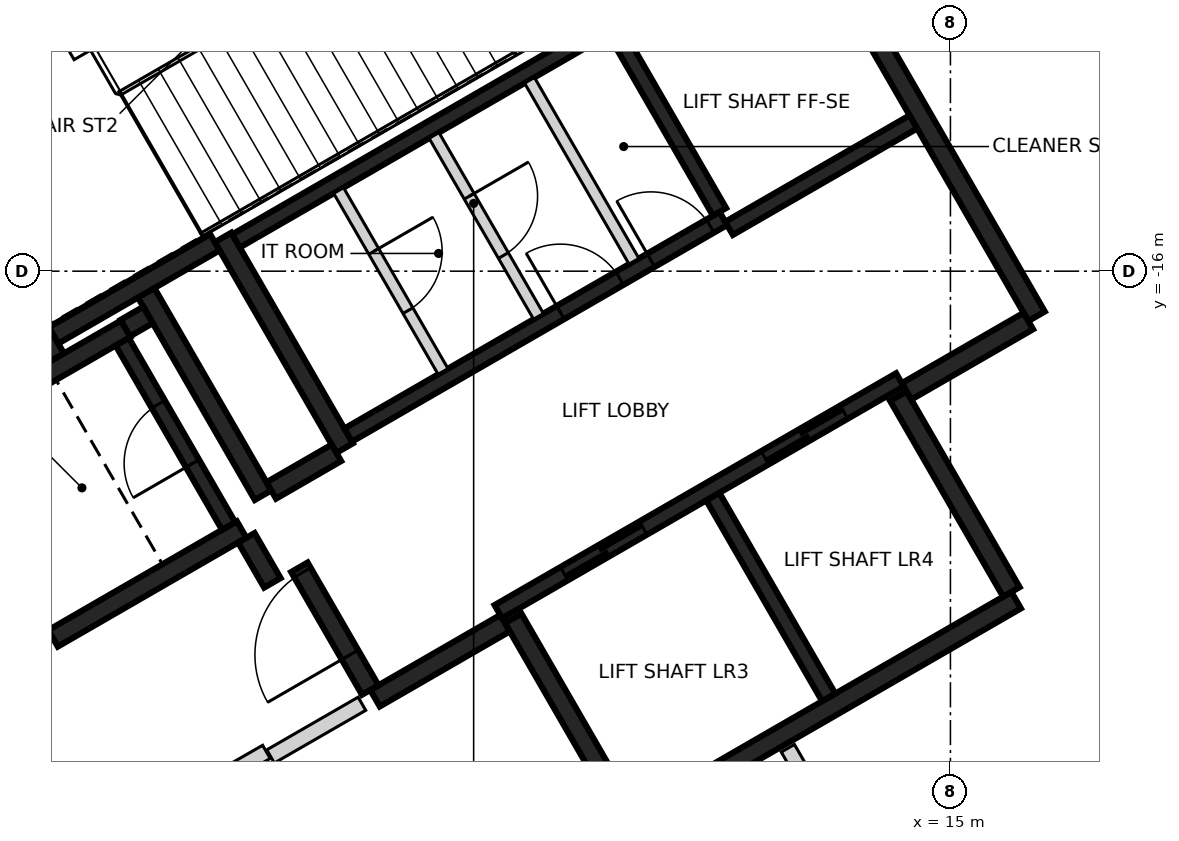
"""IFC4 building model, lengths in metres.
Left out: names, types, materials, properties, quantities, classifications, styles, units other than length and angle.
Written with IfcOpenShell. Run it as: python <this file> out.ifc"""

import sys

from ifc_helpers import new_model, si_unit, direction, frame, frame_2d, origin, place, context, subcontext, project, spatial, rectangle, extrude, element, fill, save


model = new_model("IFC4")
c1 = context("Model", 3, precision=1e-05, world=origin(), true_north=direction((0.0, 1.0)))
c2 = subcontext(c1, "Body", "Model", "MODEL_VIEW")
j1 = project(units=[si_unit("LENGTHUNIT", "METRE"), si_unit("PLANEANGLEUNIT", "RADIAN")], contexts=[c1])
p1 = place(None, origin())
s1 = spatial("IfcSite", under=j1, at=p1, CompositionType="ELEMENT")
p2 = place(p1, origin())
s2 = spatial("IfcBuilding", under=s1, at=p2, CompositionType="ELEMENT")
p3 = place(p2, frame((0.0, 0.0, 123.8)))
s3 = spatial("IfcBuildingStorey", under=s2, at=p3, CompositionType="ELEMENT", Elevation=123.8)
p4 = place(p3, frame((13.008, -11.181, 0.0), z_axis=(0.0, 0.0, 1.0), x_axis=(0.500004234368, -0.866022959057, 0.0)))
e1 = element("IfcWall", 1, at=p4, inside=s3, PredefinedType="SHEAR", context=c2, shape_type="SweptSolid", body=[
    extrude(rectangle(XDim=6.25, YDim=0.25, at=frame_2d((3.125, 0.0))), origin(), (0.0, 0.0, 1.0), 4.6),
])
p5 = place(p3, frame((15.865, -20.328, 0.0), z_axis=(0.0, 0.0, 1.0), x_axis=(-0.86602852612, -0.499994591916, 0.0)))
e2 = element("IfcWall", 2, at=p5, inside=s3, PredefinedType="SHEAR", context=c2, shape_type="SweptSolid", body=[
    extrude(rectangle(XDim=5.85, YDim=0.25, at=frame_2d((2.925, 0.0))), origin(), (0.0, 0.0, 1.0), 4.6),
])
p6 = place(p3, frame((3.235, -17.153, 0.0), z_axis=(0.0, 0.0, 1.0), x_axis=(-0.500008851346, 0.866020293397, 0.0)))
e3 = element("IfcWall", 3, at=p6, inside=s3, PredefinedType="SHEAR", context=c2, shape_type="SweptSolid", body=[
    extrude(rectangle(XDim=5.51, YDim=0.25, at=frame_2d((2.755, 0.0))), origin(), (0.0, 0.0, 1.0), 4.6),
])
p7 = place(p3, frame((7.031, -18.327, 0.0), z_axis=(0.0, 0.0, 1.0), x_axis=(-0.499971222258, 0.866042017984, 0.0)))
e4 = element("IfcWall", 4, at=p7, inside=s3, PredefinedType="SHEAR", context=c2, shape_type="SweptSolid", body=[
    extrude(rectangle(XDim=3.2, YDim=0.25, at=frame_2d((1.6, 0.0))), origin(), (0.0, 0.0, 1.0), 4.6),
])
for number, where, z_axis, x_axis in (
    (5, (14.315, -17.644, 0.0), (0.0, 0.0, 1.0), (0.5, -0.866, 0.0)),
    (6, (10.736, -23.145, 0.0), (0.0, 0.0, 1.0), (-0.5, 0.866, 0.0)),
):
    element("IfcWall", number, at=place(p3, frame(where, z_axis=z_axis, x_axis=x_axis)), inside=s3, PredefinedType="SHEAR", context=c2, shape_type="SweptSolid", body=[
        extrude(rectangle(XDim=2.974, YDim=0.25, at=frame_2d((1.487, 0.0))), origin(), (0.0, 0.0, 1.0), 4.6),
    ])
p8 = place(p3, frame((3.085, -20.894, 0.0), z_axis=(0.0, 0.0, 1.0), x_axis=(-0.499978833458, 0.866037623948, 0.0)))
e7 = element("IfcWall", 7, at=p8, inside=s3, PredefinedType="SHEAR", context=c2, shape_type="SweptSolid", body=[
    extrude(rectangle(XDim=3.05, YDim=0.25, at=frame_2d((1.525, 0.0))), origin(), (0.0, 0.0, 1.0), 4.6),
])
p9 = place(p3, frame((1.669, -18.19, 0.0), z_axis=(0.0, 0.0, 1.0), x_axis=(0.866042235819, 0.499970844928, 0.0)))
e8 = element("IfcWall", 8, at=p9, inside=s3, PredefinedType="SHEAR", context=c2, shape_type="SweptSolid", body=[
    extrude(rectangle(XDim=2.865, YDim=0.25, at=frame_2d((1.432, 0.0))), origin(), (0.0, 0.0, 1.0), 4.6),
])
p10 = place(p3, frame((5.675, -19.399, 0.0), z_axis=(0.0, 0.0, 1.0), x_axis=(-0.866026637627, -0.499997862916, 0.0)))
e9 = element("IfcWall", 9, at=p10, inside=s3, PredefinedType="SHEAR", context=c2, shape_type="SweptSolid", body=[
    extrude(rectangle(XDim=2.865, YDim=0.25, at=frame_2d((1.432, 0.0))), origin(), (0.0, 0.0, 1.0), 4.6),
])
p11 = place(p3, frame((4.414, -16.276, 0.0), z_axis=(0.0, 0.0, 1.0), x_axis=(0.500003324108, -0.866023484601, 0.0)))
e10 = element("IfcWall", 10, at=p11, inside=s3, PredefinedType="SHEAR", context=c2, shape_type="SweptSolid", body=[
    extrude(rectangle(XDim=3.085, YDim=0.25, at=frame_2d((1.542, 0.0))), origin(), (0.0, 0.0, 1.0), 4.6),
])
p12 = place(p3, frame((5.322, -15.619, 0.0), z_axis=(0.0, 0.0, 1.0), x_axis=(-0.866026229868, -0.499998569178, 0.0)))
e11 = element("IfcWall", 11, at=p12, inside=s3, PredefinedType="SHEAR", context=c2, shape_type="SweptSolid", body=[
    extrude(rectangle(XDim=2.449, YDim=0.25, at=frame_2d((1.225, 0.0))), origin(), (0.0, 0.0, 1.0), 4.6),
])
p13 = place(p3, frame((9.14, -20.631, 0.0), z_axis=(0.0, 0.0, 1.0), x_axis=(-0.866043531843, -0.499968599967, 0.0)))
e12 = element("IfcWall", 12, at=p13, inside=s3, PredefinedType="SHEAR", context=c2, shape_type="SweptSolid", body=[
    extrude(rectangle(XDim=1.975, YDim=0.25, at=frame_2d((0.987, 0.0))), origin(), (0.0, 0.0, 1.0), 4.6),
])
p14 = place(p3, frame((16.025, -16.656, 0.0), z_axis=(0.0, 0.0, 1.0), x_axis=(-0.866016279763, -0.500015802937, 0.0)))
e13 = element("IfcWall", 13, at=p14, inside=s3, PredefinedType="SHEAR", context=c2, shape_type="SweptSolid", body=[
    extrude(rectangle(XDim=1.849, YDim=0.25, at=frame_2d((0.925, 0.0))), origin(), (0.0, 0.0, 1.0), 4.6),
])
p15 = place(p3, frame((7.367, -21.51, 0.0), z_axis=(0.0, 0.0, 1.0), x_axis=(-0.499983108224, 0.866035156036, 0.0)))
e14 = element("IfcWall", 14, at=p15, inside=s3, PredefinedType="SHEAR", context=c2, shape_type="SweptSolid", body=[
    extrude(rectangle(XDim=1.865, YDim=0.25, at=frame_2d((0.932, 0.0))), origin(), (0.0, 0.0, 1.0), 4.6),
])
p16 = place(p15, frame((0.535, 0.0, 0.0)))
e15 = element("IfcOpeningElement", 15, at=p16, cuts=e14, PredefinedType="OPENING", context=c2, shape_type="SweptSolid", body=[
    extrude(rectangle(XDim=1.25, YDim=2.1, at=frame_2d((0.625, 1.05))), frame((0.0, 0.135, 0.0), z_axis=(0.0, -1.0, 0.0), x_axis=(1.0, 0.0, 0.0)), (0.0, 0.0, 1.0), 0.27),
])
p17 = place(p3, frame((6.065, -18.885, 0.0), z_axis=(0.0, 0.0, 1.0), x_axis=(0.866017078145, 0.500014420154, 0.0)))
e16 = element("IfcWall", 16, at=p17, inside=s3, PredefinedType="SHEAR", context=c2, shape_type="SweptSolid", body=[
    extrude(rectangle(XDim=0.989, YDim=0.25, at=frame_2d((0.495, 0.0))), origin(), (0.0, 0.0, 1.0), 4.6),
])
p18 = place(p3, frame((6.08, -20.1, 0.0), z_axis=(0.0, 0.0, 1.0), x_axis=(-0.500051773299, 0.865995510393, 0.0)))
e17 = element("IfcWall", 17, at=p18, inside=s3, PredefinedType="SHEAR", context=c2, shape_type="SweptSolid", body=[
    extrude(rectangle(XDim=0.685, YDim=0.25, at=frame_2d((0.342, 0.0))), origin(), (0.0, 0.0, 1.0), 4.6),
])
p19 = place(p3, frame((4.145, -16.749, 0.0), z_axis=(0.0, 0.0, 1.0), x_axis=(0.866185586049, 0.49972245349, 0.0)))
e18 = element("IfcWall", 18, at=p19, inside=s3, PredefinedType="SHEAR", context=c2, shape_type="SweptSolid", body=[
    extrude(rectangle(XDim=0.344, YDim=0.25, at=frame_2d((0.172, 0.0))), origin(), (0.0, 0.0, 1.0), 4.6),
])
p20 = place(p3, frame((9.052, -20.48, 0.0), z_axis=(0.0, 0.0, 1.0), x_axis=(0.866030299012, 0.499991521122, 0.0)))
e19 = element("IfcWall", 19, at=p20, inside=s3, PredefinedType="SHEAR", context=c2, shape_type="SweptSolid", body=[
    extrude(rectangle(XDim=6.1, YDim=0.2, at=frame_2d((3.05, 0.0))), origin(), (0.0, 0.0, 1.0), 4.6),
])
p21 = place(p20, frame((1.0, 0.0, 0.0)))
e20 = element("IfcOpeningElement", 20, at=p21, cuts=e19, PredefinedType="OPENING", context=c2, shape_type="SweptSolid", body=[
    extrude(rectangle(XDim=1.2, YDim=2.1, at=frame_2d((0.6, 1.05))), frame((0.0, 0.11, 0.0), z_axis=(0.0, -1.0, 0.0), x_axis=(1.0, 0.0, 0.0)), (0.0, 0.0, 1.0), 0.22),
])
p22 = place(p20, frame((4.05, 0.0, 0.0)))
e21 = element("IfcOpeningElement", 21, at=p22, cuts=e19, PredefinedType="OPENING", context=c2, shape_type="SweptSolid", body=[
    extrude(rectangle(XDim=1.2, YDim=2.1, at=frame_2d((0.6, 1.05))), frame((0.0, 0.11, 0.0), z_axis=(0.0, -1.0, 0.0), x_axis=(1.0, 0.0, 0.0)), (0.0, 0.0, 1.0), 0.22),
])
p23 = place(p3, frame((10.538, -12.752, 0.0), z_axis=(0.0, 0.0, 1.0), x_axis=(-0.866038630372, -0.499977090179, 0.0)))
e22 = element("IfcWall", 22, at=p23, inside=s3, PredefinedType="SHEAR", context=c2, shape_type="SweptSolid", body=[
    extrude(rectangle(XDim=5.699, YDim=0.2, at=frame_2d((2.85, 0.0))), origin(), (0.0, 0.0, 1.0), 4.6),
])
p24 = place(p3, frame((7.077, -18.156, 0.0), z_axis=(0.0, 0.0, 1.0), x_axis=(0.866038630372, 0.499977090179, 0.0)))
e23 = element("IfcWall", 23, at=p24, inside=s3, PredefinedType="SHEAR", context=c2, shape_type="SweptSolid", body=[
    extrude(rectangle(XDim=5.699, YDim=0.2, at=frame_2d((2.85, 0.0))), origin(), (0.0, 0.0, 1.0), 4.6),
])
p25 = place(p24, frame((3.224, 0.0, 0.0)))
e24 = element("IfcOpeningElement", 24, at=p25, cuts=e23, PredefinedType="OPENING", context=c2, shape_type="SweptSolid", body=[
    extrude(rectangle(XDim=0.9, YDim=2.1, at=frame_2d((0.45, 1.05))), frame((0.0, 0.11, 0.0), z_axis=(0.0, -1.0, 0.0), x_axis=(1.0, 0.0, 0.0)), (0.0, 0.0, 1.0), 0.22),
])
p26 = place(p24, frame((4.599, 0.0, 0.0)))
e25 = element("IfcOpeningElement", 25, at=p26, cuts=e23, PredefinedType="OPENING", context=c2, shape_type="SweptSolid", body=[
    extrude(rectangle(XDim=0.9, YDim=2.1, at=frame_2d((0.45, 1.05))), frame((0.0, 0.11, 0.0), z_axis=(0.0, -1.0, 0.0), x_axis=(1.0, 0.0, 0.0)), (0.0, 0.0, 1.0), 0.22),
])
p27 = place(p3, frame((11.875, -18.967, 0.0), z_axis=(0.0, 0.0, 1.0), x_axis=(0.49998131003, -0.866036194175, 0.0)))
e26 = element("IfcWall", 26, at=p27, inside=s3, PredefinedType="SHEAR", context=c2, shape_type="SweptSolid", body=[
    extrude(rectangle(XDim=3.048, YDim=0.2, at=frame_2d((1.524, 0.0))), origin(), (0.0, 0.0, 1.0), 4.6),
])
p28 = place(p3, frame((5.503, -19.352, 0.0), z_axis=(0.0, 0.0, 1.0), x_axis=(-0.499986818241, 0.866033014143, 0.0)))
e27 = element("IfcWall", 27, at=p28, inside=s3, PredefinedType="SHEAR", context=c2, shape_type="SweptSolid", body=[
    extrude(rectangle(XDim=2.798, YDim=0.2, at=frame_2d((1.399, 0.0))), origin(), (0.0, 0.0, 1.0), 4.6),
])
p29 = place(p28, frame((0.949, 0.0, 0.0)))
e28 = element("IfcOpeningElement", 28, at=p29, cuts=e27, PredefinedType="OPENING", context=c2, shape_type="SweptSolid", body=[
    extrude(rectangle(XDim=0.9, YDim=2.1, at=frame_2d((0.45, 1.05))), frame((0.0, 0.11, 0.0), z_axis=(0.0, -1.0, 0.0), x_axis=(1.0, 0.0, 0.0)), (0.0, 0.0, 1.0), 0.22),
])
p30 = place(p3, frame((11.963, -15.22, 0.0), z_axis=(0.0, 0.0, 1.0), x_axis=(-0.500034990121, 0.866005201286, 0.0)))
e29 = element("IfcWall", 29, at=p30, inside=s3, PredefinedType="SHEAR", context=c2, shape_type="SweptSolid", body=[
    extrude(rectangle(XDim=2.75, YDim=0.2, at=frame_2d((1.375, 0.0))), origin(), (0.0, 0.0, 1.0), 4.6),
])
p31 = place(p3, frame((14.512, -14.037, 0.0), z_axis=(0.0, 0.0, 1.0), x_axis=(-0.866044696403, -0.499966582715, 0.0)))
e30 = element("IfcWall", 30, at=p31, inside=s3, PredefinedType="SHEAR", context=c2, shape_type="SweptSolid", body=[
    extrude(rectangle(XDim=2.799, YDim=0.2, at=frame_2d((1.399, 0.0))), origin(), (0.0, 0.0, 1.0), 4.6),
])
p32 = place(p3, frame((8.207, -14.214, 0.0), z_axis=(0.0, 0.0, 1.0), x_axis=(0.50002746344, -0.86600954718, 0.0)))
e31 = element("IfcWall", 31, at=p32, inside=s3, PredefinedType="PARTITIONING", context=c2, shape_type="SweptSolid", body=[
    extrude(rectangle(XDim=2.748, YDim=0.15, at=frame_2d((1.374, 0.0))), origin(), (0.0, 0.0, 1.0), 4.6),
])
p33 = place(p32, frame((0.924, 0.0, 0.0)))
e32 = element("IfcOpeningElement", 32, at=p33, cuts=e31, PredefinedType="OPENING", context=c2, shape_type="SweptSolid", body=[
    extrude(rectangle(XDim=0.9, YDim=2.1, at=frame_2d((0.45, 1.05))), frame((0.0, 0.085, 0.0), z_axis=(0.0, -1.0, 0.0), x_axis=(1.0, 0.0, 0.0)), (0.0, 0.0, 1.0), 0.17),
])
p34 = place(p3, frame((9.462, -13.489, 0.0), z_axis=(0.0, 0.0, 1.0), x_axis=(0.499988999718, -0.866031754707, 0.0)))
e33 = element("IfcWall", 33, at=p34, inside=s3, PredefinedType="PARTITIONING", context=c2, shape_type="SweptSolid", body=[
    extrude(rectangle(XDim=2.749, YDim=0.15, at=frame_2d((1.374, 0.0))), origin(), (0.0, 0.0, 1.0), 4.6),
])
p35 = place(p3, frame((6.951, -14.939, 0.0), z_axis=(0.0, 0.0, 1.0), x_axis=(0.499988999718, -0.866031754707, 0.0)))
e34 = element("IfcWall", 34, at=p35, inside=s3, PredefinedType="PARTITIONING", context=c2, shape_type="SweptSolid", body=[
    extrude(rectangle(XDim=2.749, YDim=0.15, at=frame_2d((1.374, 0.0))), origin(), (0.0, 0.0, 1.0), 4.6),
])
p36 = place(p35, frame((0.924, 0.0, 0.0)))
e35 = element("IfcOpeningElement", 35, at=p36, cuts=e34, PredefinedType="OPENING", context=c2, shape_type="SweptSolid", body=[
    extrude(rectangle(XDim=0.9, YDim=2.1, at=frame_2d((0.45, 1.05))), frame((0.0, 0.085, 0.0), z_axis=(0.0, -1.0, 0.0), x_axis=(1.0, 0.0, 0.0)), (0.0, 0.0, 1.0), 0.17),
])
p37 = place(p3, frame((4.019, -23.459, 0.0), z_axis=(0.0, 0.0, 1.0), x_axis=(0.867775707364, 0.496956056114, 0.0)))
e36 = element("IfcWall", 36, at=p37, inside=s3, PredefinedType="PARTITIONING", context=c2, shape_type="SweptSolid", body=[
    extrude(rectangle(XDim=2.284, YDim=0.2, at=frame_2d((1.142, 0.0))), origin(), (0.0, 0.0, 1.0), 4.6),
])
p38 = place(p3, frame((6.056, -22.384, 0.0), z_axis=(0.0, 0.0, 1.0), x_axis=(0.866276386163, 0.499565033581, 0.0)))
e37 = element("IfcWall", 37, at=p38, inside=s3, PredefinedType="PARTITIONING", context=c2, shape_type="SweptSolid", body=[
    extrude(rectangle(XDim=1.387, YDim=0.2, at=frame_2d((0.694, 0.0))), origin(), (0.0, 0.0, 1.0), 4.6),
])
p39 = place(p3, frame((12.861, -22.276, 0.0), z_axis=(0.0, 0.0, 1.0), x_axis=(0.500032570359, -0.866006598462, 0.0)))
e38 = element("IfcWall", 38, at=p39, inside=s3, PredefinedType="PARTITIONING", context=c2, shape_type="SweptSolid", body=[
    extrude(rectangle(XDim=7.587, YDim=0.2, at=frame_2d((3.793, 0.0))), origin(), (0.0, 0.0, 1.0), 4.6),
])
p40 = place(p39, frame((1.077, 0.0, 0.0)))
e39 = element("IfcOpeningElement", 39, at=p40, cuts=e38, PredefinedType="OPENING", context=c2, shape_type="SweptSolid", body=[
    extrude(rectangle(XDim=0.9, YDim=2.1, at=frame_2d((0.45, 1.05))), frame((0.0, 0.11, 0.0), z_axis=(0.0, -1.0, 0.0), x_axis=(1.0, 0.0, 0.0)), (0.0, 0.0, 1.0), 0.22),
])
p41 = place(p21, origin())
e40 = element("IfcDoor", 40, at=p41, inside=s3, OperationType="DOUBLE_DOOR_SLIDING", PredefinedType="DOOR", context=c2, shape_type="SweptSolid", body=[
    extrude(rectangle(XDim=1.2, YDim=2.1, at=frame_2d((0.6, 1.05))), frame((0.0, 0.025, 0.0), z_axis=(0.0, -1.0, 0.0), x_axis=(1.0, 0.0, 0.0)), (0.0, 0.0, 1.0), 0.05),
])
fill(e20, e40)
p42 = place(p22, origin())
e41 = element("IfcDoor", 41, at=p42, inside=s3, OperationType="DOUBLE_DOOR_SLIDING", PredefinedType="DOOR", context=c2, shape_type="SweptSolid", body=[
    extrude(rectangle(XDim=1.2, YDim=2.1, at=frame_2d((0.6, 1.05))), frame((0.0, 0.025, 0.0), z_axis=(0.0, -1.0, 0.0), x_axis=(1.0, 0.0, 0.0)), (0.0, 0.0, 1.0), 0.05),
])
fill(e21, e41)
p43 = place(p16, origin())
e42 = element("IfcDoor", 42, at=p43, inside=s3, OperationType="SINGLE_SWING_LEFT", PredefinedType="DOOR", context=c2, shape_type="SweptSolid", body=[
    extrude(rectangle(XDim=1.25, YDim=2.1, at=frame_2d((0.625, 1.05))), frame((0.0, 0.025, 0.0), z_axis=(0.0, -1.0, 0.0), x_axis=(1.0, 0.0, 0.0)), (0.0, 0.0, 1.0), 0.05),
])
fill(e15, e42)
p44 = place(p25, origin())
e43 = element("IfcDoor", 43, at=p44, inside=s3, OperationType="SINGLE_SWING_RIGHT", PredefinedType="DOOR", context=c2, shape_type="SweptSolid", body=[
    extrude(rectangle(XDim=0.9, YDim=2.1, at=frame_2d((0.45, 1.05))), frame((0.0, 0.025, 0.0), z_axis=(0.0, -1.0, 0.0), x_axis=(1.0, 0.0, 0.0)), (0.0, 0.0, 1.0), 0.05),
])
fill(e24, e43)
p45 = place(p26, origin())
e44 = element("IfcDoor", 44, at=p45, inside=s3, OperationType="SINGLE_SWING_LEFT", PredefinedType="DOOR", context=c2, shape_type="SweptSolid", body=[
    extrude(rectangle(XDim=0.9, YDim=2.1, at=frame_2d((0.45, 1.05))), frame((0.0, 0.025, 0.0), z_axis=(0.0, -1.0, 0.0), x_axis=(1.0, 0.0, 0.0)), (0.0, 0.0, 1.0), 0.05),
])
fill(e25, e44)
p46 = place(p29, origin())
e45 = element("IfcDoor", 45, at=p46, inside=s3, OperationType="SINGLE_SWING_RIGHT", PredefinedType="DOOR", context=c2, shape_type="SweptSolid", body=[
    extrude(rectangle(XDim=0.9, YDim=2.1, at=frame_2d((0.45, 1.05))), frame((0.0, 0.025, 0.0), z_axis=(0.0, -1.0, 0.0), x_axis=(1.0, 0.0, 0.0)), (0.0, 0.0, 1.0), 0.05),
])
fill(e28, e45)
p47 = place(p33, origin())
e46 = element("IfcDoor", 46, at=p47, inside=s3, OperationType="SINGLE_SWING_LEFT", PredefinedType="DOOR", context=c2, shape_type="SweptSolid", body=[
    extrude(rectangle(XDim=0.9, YDim=2.1, at=frame_2d((0.45, 1.05))), frame((0.0, 0.025, 0.0), z_axis=(0.0, -1.0, 0.0), x_axis=(1.0, 0.0, 0.0)), (0.0, 0.0, 1.0), 0.05),
])
fill(e32, e46)
p48 = place(p36, origin())
e47 = element("IfcDoor", 47, at=p48, inside=s3, OperationType="SINGLE_SWING_RIGHT", PredefinedType="DOOR", context=c2, shape_type="SweptSolid", body=[
    extrude(rectangle(XDim=0.9, YDim=2.1, at=frame_2d((0.45, 1.05))), frame((0.0, 0.025, 0.0), z_axis=(0.0, -1.0, 0.0), x_axis=(1.0, 0.0, 0.0)), (0.0, 0.0, 1.0), 0.05),
])
fill(e35, e47)
save(model, sys.argv[1])
